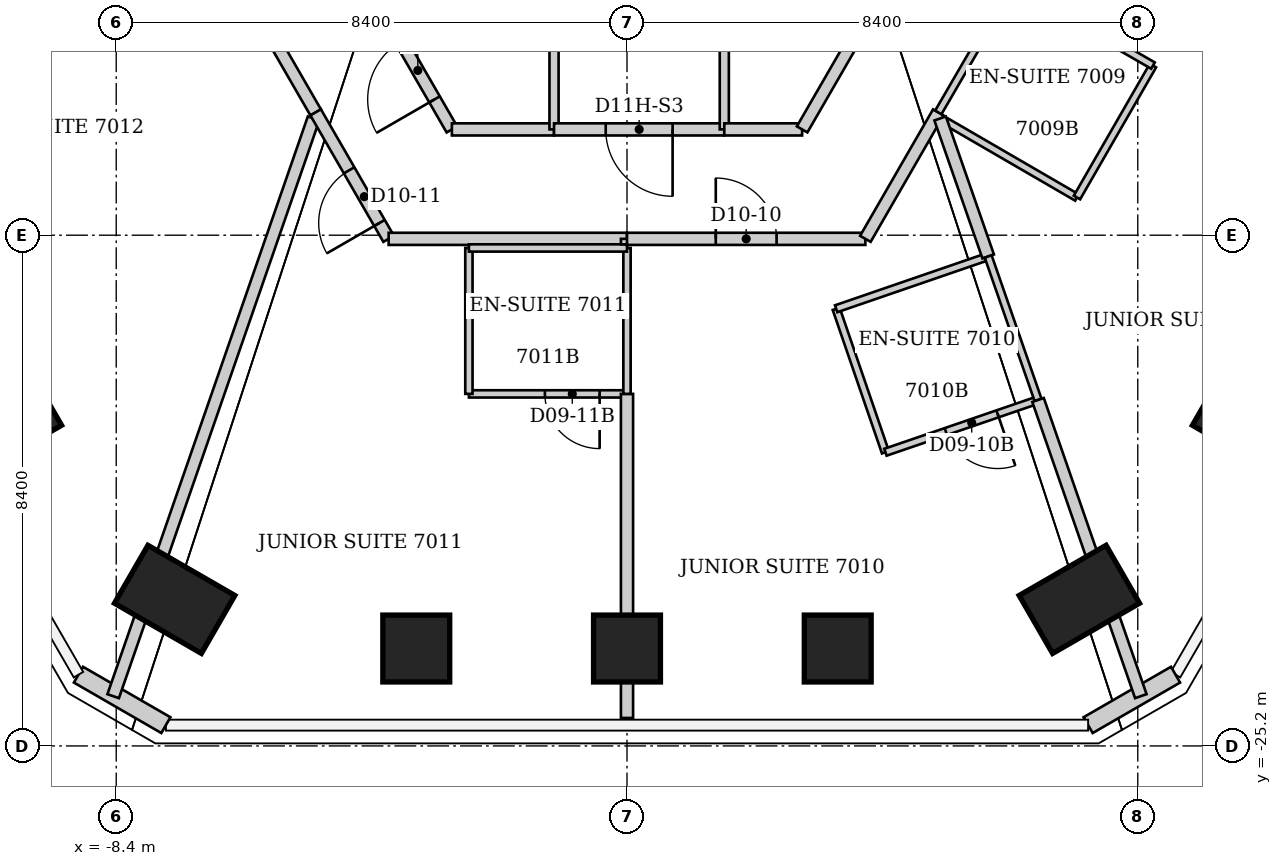
"""IFC4 building model, lengths in metres.
Left out: names, types, materials, properties, quantities, classifications, styles, units other than length and angle.
Written with IfcOpenShell. Run it as: python <this file> out.ifc"""

import sys

from ifc_helpers import new_model, si_unit, direction, frame, frame_2d, origin, origin_2d, place, context, subcontext, project, spatial, rectangle, extrude, element, fill, save


model = new_model("IFC4")
c1 = context("Model", 3, precision=1e-05, world=origin(), true_north=direction((0.0, 1.0)))
c2 = subcontext(c1, "Body", "Model", "MODEL_VIEW")
j1 = project(units=[si_unit("LENGTHUNIT", "METRE"), si_unit("PLANEANGLEUNIT", "RADIAN")], contexts=[c1])
p1 = place(None, origin())
s1 = spatial("IfcSite", under=j1, at=p1, CompositionType="ELEMENT")
p2 = place(p1, origin())
s2 = spatial("IfcBuilding", under=s1, at=p2, CompositionType="ELEMENT")
p3 = place(p2, frame((0.0, 0.0, 279.8)))
s3 = spatial("IfcBuildingStorey", under=s2, at=p3, CompositionType="ELEMENT", Elevation=279.8)
p4 = place(p3, frame((10.05, -19.725, 0.0), z_axis=(0.0, 0.0, 1.0), x_axis=(0.866025403784, -0.5, 0.0)))
e1 = element("IfcColumn", 1, at=p4, inside=s3, PredefinedType="COLUMN", context=c2, shape_type="SweptSolid", body=[
    extrude(rectangle(XDim=1.1, YDim=1.1, at=origin_2d()), origin(), (0.0, 0.0, 1.0), 3.8),
])
p5 = place(p3, frame((7.439, -22.79, 0.0), z_axis=(0.0, 0.0, 1.0), x_axis=(0.5, -0.866025403784, 0.0)))
e2 = element("IfcColumn", 2, at=p5, inside=s3, PredefinedType="COLUMN", context=c2, shape_type="SweptSolid", body=[
    extrude(rectangle(XDim=1.1, YDim=1.65, at=origin_2d()), origin(), (0.0, 0.0, 1.0), 3.8),
])
for number, where, z_axis, x_axis in (
    (3, (3.466, -23.598, 0.0), (0.0, 0.0, 1.0), (0.0, -1.0, 0.0)),
    (4, (0.0, -23.598, 0.0), (0.0, 0.0, 1.0), (0.0, -1.0, 0.0)),
    (5, (-3.466, -23.598, 0.0), (0.0, 0.0, 1.0), (0.0, -1.0, 0.0)),
):
    element("IfcColumn", number, at=place(p3, frame(where, z_axis=z_axis, x_axis=x_axis)), inside=s3, PredefinedType="COLUMN", context=c2, shape_type="SweptSolid", body=[
        extrude(rectangle(XDim=1.1, YDim=1.1, at=origin_2d()), origin(), (0.0, 0.0, 1.0), 3.8),
    ])
p6 = place(p3, frame((-7.439, -22.79, 0.0), z_axis=(0.0, 0.0, 1.0), x_axis=(-0.5, -0.866025403784, 0.0)))
e6 = element("IfcColumn", 6, at=p6, inside=s3, PredefinedType="COLUMN", context=c2, shape_type="SweptSolid", body=[
    extrude(rectangle(XDim=1.1, YDim=1.65, at=origin_2d()), origin(), (0.0, 0.0, 1.0), 3.8),
])
p7 = place(p3, frame((-10.05, -19.725, 0.0), z_axis=(0.0, 0.0, 1.0), x_axis=(-0.866025403784, -0.5, 0.0)))
e7 = element("IfcColumn", 7, at=p7, inside=s3, PredefinedType="COLUMN", context=c2, shape_type="SweptSolid", body=[
    extrude(rectangle(XDim=1.1, YDim=1.1, at=origin_2d()), origin(), (0.0, 0.0, 1.0), 3.8),
])
for number, where, z_axis, x_axis in (
    (8, (9.021, -24.028, 0.0), (0.0, 0.0, 1.0), (-0.866, -0.5, 0.0)),
    (9, (-7.583, -24.858, 0.0), (0.0, 0.0, 1.0), (-0.866, 0.5, 0.0)),
):
    element("IfcWall", number, at=place(p3, frame(where, z_axis=z_axis, x_axis=x_axis)), inside=s3, PredefinedType="SOLIDWALL", context=c2, shape_type="SweptSolid", body=[
        extrude(rectangle(XDim=1.66, YDim=0.3, at=frame_2d((0.83, 0.0))), origin(), (0.0, 0.0, 1.0), 3.64),
    ])
p8 = place(p3, frame((-8.45, -24.382, 0.0), z_axis=(0.0, 0.0, 1.0), x_axis=(0.327695764917, 0.944783300898, 0.0)))
e10 = element("IfcWall", 10, at=p8, inside=s3, PredefinedType="PARTITIONING", context=c2, shape_type="SweptSolid", body=[
    extrude(rectangle(XDim=10.058, YDim=0.2, at=frame_2d((5.029, 0.0))), origin(), (0.0, 0.0, 1.0), 3.64),
])
p9 = place(p3, frame((-8.11, -9.6, 0.0), z_axis=(0.0, 0.0, 1.0), x_axis=(0.49991915452, -0.866072074913, 0.0)))
e11 = element("IfcWall", 11, at=p9, inside=s3, PredefinedType="PARTITIONING", context=c2, shape_type="SweptSolid", body=[
    extrude(rectangle(XDim=5.981, YDim=0.2, at=frame_2d((2.99, 0.0))), origin(), (0.0, 0.0, 1.0), 3.64),
])
p10 = place(p9, frame((2.49, 0.0, 0.0)))
e12 = element("IfcOpeningElement", 12, at=p10, cuts=e11, PredefinedType="OPENING", context=c2, shape_type="SweptSolid", body=[
    extrude(rectangle(XDim=1.0, YDim=2.13, at=frame_2d((0.5, 1.065))), frame((0.0, 0.1, 0.0), z_axis=(0.0, -1.0, 0.0), x_axis=(1.0, 0.0, 0.0)), (0.0, 0.0, 1.0), 0.2),
])
p11 = place(p3, frame((-5.12, -14.78, 0.0), z_axis=(0.0, 0.0, 1.0), x_axis=(0.499813401482, -0.866133109688, 0.0)))
e13 = element("IfcWall", 13, at=p11, inside=s3, PredefinedType="PARTITIONING", context=c2, shape_type="SweptSolid", body=[
    extrude(rectangle(XDim=2.401, YDim=0.2, at=frame_2d((1.201, 0.0))), origin(), (0.0, 0.0, 1.0), 3.64),
])
p12 = place(p11, frame((1.1, 0.0, 0.0)))
e14 = element("IfcOpeningElement", 14, at=p12, cuts=e13, PredefinedType="OPENING", context=c2, shape_type="SweptSolid", body=[
    extrude(rectangle(XDim=1.0, YDim=2.13, at=frame_2d((0.5, 1.065))), frame((0.0, 0.1, 0.0), z_axis=(0.0, -1.0, 0.0), x_axis=(1.0, 0.0, 0.0)), (0.0, 0.0, 1.0), 0.2),
])
p13 = place(p3, frame((-3.92, -16.86, 0.0), z_axis=(0.0, 0.0, 1.0), x_axis=(1.0, 0.0, 0.0)))
e15 = element("IfcWall", 15, at=p13, inside=s3, PredefinedType="PARTITIONING", context=c2, shape_type="SweptSolid", body=[
    extrude(rectangle(XDim=3.92, YDim=0.2, at=frame_2d((1.96, 0.0))), origin(), (0.0, 0.0, 1.0), 3.64),
])
p14 = place(p3, frame((-2.88, -15.06, 0.0), z_axis=(0.0, 0.0, 1.0), x_axis=(-0.499983441833, 0.866034963436, 0.0)))
e16 = element("IfcWall", 16, at=p14, inside=s3, PredefinedType="PARTITIONING", context=c2, shape_type="SweptSolid", body=[
    extrude(rectangle(XDim=2.24, YDim=0.2, at=frame_2d((1.12, 0.0))), origin(), (0.0, 0.0, 1.0), 3.64),
])
p15 = place(p14, frame((0.57, 0.0, 0.0)))
e17 = element("IfcOpeningElement", 17, at=p15, cuts=e16, PredefinedType="OPENING", context=c2, shape_type="SweptSolid", body=[
    extrude(rectangle(XDim=1.1, YDim=2.2, at=frame_2d((0.55, 1.1))), frame((0.0, 0.1, 0.0), z_axis=(0.0, -1.0, 0.0), x_axis=(1.0, 0.0, 0.0)), (0.0, 0.0, 1.0), 0.2),
])
p16 = place(p3, frame((-2.6, -19.41, 0.0), z_axis=(0.0, 0.0, 1.0), x_axis=(1.0, 0.0, 0.0)))
e18 = element("IfcWall", 18, at=p16, inside=s3, PredefinedType="PARTITIONING", context=c2, shape_type="SweptSolid", body=[
    extrude(rectangle(XDim=2.6, YDim=0.12, at=frame_2d((1.3, 0.0))), origin(), (0.0, 0.0, 1.0), 3.64),
])
p17 = place(p16, frame((1.25, 0.0, 0.0)))
e19 = element("IfcOpeningElement", 19, at=p17, cuts=e18, PredefinedType="OPENING", context=c2, shape_type="SweptSolid", body=[
    extrude(rectangle(XDim=0.9, YDim=2.03, at=frame_2d((0.45, 1.015))), frame((0.0, 0.06, 0.0), z_axis=(0.0, -1.0, 0.0), x_axis=(1.0, 0.0, 0.0)), (0.0, 0.0, 1.0), 0.12),
])
p18 = place(p3, frame((-2.6, -17.01, 0.0), z_axis=(0.0, 0.0, 1.0), x_axis=(0.0, -1.0, 0.0)))
e20 = element("IfcWall", 20, at=p18, inside=s3, PredefinedType="PARTITIONING", context=c2, shape_type="SweptSolid", body=[
    extrude(rectangle(XDim=2.4, YDim=0.12, at=frame_2d((1.2, 0.0))), origin(), (0.0, 0.0, 1.0), 3.64),
])
p19 = place(p3, frame((-1.2, -15.06, 0.0), z_axis=(0.0, 0.0, 1.0), x_axis=(-1.0, 0.0, 0.0)))
e21 = element("IfcWall", 21, at=p19, inside=s3, PredefinedType="PARTITIONING", context=c2, shape_type="SweptSolid", body=[
    extrude(rectangle(XDim=1.68, YDim=0.2, at=frame_2d((0.84, 0.0))), origin(), (0.0, 0.0, 1.0), 3.64),
])
p20 = place(p3, frame((-1.2, -6.7, 0.0), z_axis=(0.0, 0.0, 1.0), x_axis=(0.0, -1.0, 0.0)))
e22 = element("IfcWall", 22, at=p20, inside=s3, PredefinedType="PARTITIONING", context=c2, shape_type="SweptSolid", body=[
    extrude(rectangle(XDim=8.36, YDim=0.15, at=frame_2d((4.18, 0.0))), origin(), (0.0, 0.0, 1.0), 3.64),
])
p21 = place(p3, frame((0.0, -24.74, 0.0), z_axis=(0.0, 0.0, 1.0), x_axis=(0.0, 1.0, 0.0)))
e23 = element("IfcWall", 23, at=p21, inside=s3, PredefinedType="PARTITIONING", context=c2, shape_type="SweptSolid", body=[
    extrude(rectangle(XDim=5.33, YDim=0.2, at=frame_2d((2.665, 0.0))), origin(), (0.0, 0.0, 1.0), 2.86),
])
p22 = place(p3, frame((0.0, -19.41, 0.0), z_axis=(0.0, 0.0, 1.0), x_axis=(0.0, 1.0, 0.0)))
e24 = element("IfcWall", 24, at=p22, inside=s3, PredefinedType="PARTITIONING", context=c2, shape_type="SweptSolid", body=[
    extrude(rectangle(XDim=2.4, YDim=0.12, at=frame_2d((1.2, 0.0))), origin(), (0.0, 0.0, 1.0), 2.86),
])
p23 = place(p3, frame((0.0, -17.01, 0.0), z_axis=(0.0, 0.0, 1.0), x_axis=(-1.0, 0.0, 0.0)))
e25 = element("IfcWall", 25, at=p23, inside=s3, PredefinedType="PARTITIONING", context=c2, shape_type="SweptSolid", body=[
    extrude(rectangle(XDim=2.6, YDim=0.12, at=frame_2d((1.3, 0.0))), origin(), (0.0, 0.0, 1.0), 3.64),
])
p24 = place(p3, frame((0.0, -16.95, 0.0), z_axis=(0.0, 0.0, 1.0), x_axis=(0.0, 1.0, 0.0)))
e26 = element("IfcWall", 26, at=p24, inside=s3, PredefinedType="PARTITIONING", context=c2, shape_type="SweptSolid", body=[
    extrude(rectangle(XDim=0.09, YDim=0.2, at=frame_2d((0.045, 0.0))), origin(), (0.0, 0.0, 1.0), 3.64),
])
p25 = place(p3, frame((0.0, -16.86, 0.0), z_axis=(0.0, 0.0, 1.0), x_axis=(1.0, 0.0, 0.0)))
e27 = element("IfcWall", 27, at=p25, inside=s3, PredefinedType="PARTITIONING", context=c2, shape_type="SweptSolid", body=[
    extrude(rectangle(XDim=3.92, YDim=0.2, at=frame_2d((1.96, 0.0))), origin(), (0.0, 0.0, 1.0), 3.64),
])
p26 = place(p25, frame((1.46, 0.0, 0.0)))
e28 = element("IfcOpeningElement", 28, at=p26, cuts=e27, PredefinedType="OPENING", context=c2, shape_type="SweptSolid", body=[
    extrude(rectangle(XDim=1.0, YDim=2.13, at=frame_2d((0.5, 1.065))), frame((0.0, 0.1, 0.0), z_axis=(0.0, -1.0, 0.0), x_axis=(1.0, 0.0, 0.0)), (0.0, 0.0, 1.0), 0.2),
])
p27 = place(p3, frame((1.6, -15.06, 0.0), z_axis=(0.0, 0.0, 1.0), x_axis=(-1.0, 0.0, 0.0)))
e29 = element("IfcWall", 29, at=p27, inside=s3, PredefinedType="PARTITIONING", context=c2, shape_type="SweptSolid", body=[
    extrude(rectangle(XDim=2.8, YDim=0.2, at=frame_2d((1.4, 0.0))), origin(), (0.0, 0.0, 1.0), 3.64),
])
p28 = place(p27, frame((0.85, 0.0, 0.0)))
e30 = element("IfcOpeningElement", 30, at=p28, cuts=e29, PredefinedType="OPENING", context=c2, shape_type="SweptSolid", body=[
    extrude(rectangle(XDim=1.1, YDim=2.2, at=frame_2d((0.55, 1.1))), frame((0.0, 0.1, 0.0), z_axis=(0.0, -1.0, 0.0), x_axis=(1.0, 0.0, 0.0)), (0.0, 0.0, 1.0), 0.2),
])
p29 = place(p3, frame((1.6, -6.7, 0.0), z_axis=(0.0, 0.0, 1.0), x_axis=(0.0, -1.0, 0.0)))
e31 = element("IfcWall", 31, at=p29, inside=s3, PredefinedType="PARTITIONING", context=c2, shape_type="SweptSolid", body=[
    extrude(rectangle(XDim=8.36, YDim=0.15, at=frame_2d((4.18, 0.0))), origin(), (0.0, 0.0, 1.0), 2.86),
])
p30 = place(p3, frame((2.88, -15.06, 0.0), z_axis=(0.0, 0.0, 1.0), x_axis=(-1.0, 0.0, 0.0)))
e32 = element("IfcWall", 32, at=p30, inside=s3, PredefinedType="PARTITIONING", context=c2, shape_type="SweptSolid", body=[
    extrude(rectangle(XDim=1.28, YDim=0.2, at=frame_2d((0.64, 0.0))), origin(), (0.0, 0.0, 1.0), 3.64),
])
p31 = place(p3, frame((3.44, -18.01, 0.0), z_axis=(0.0, 0.0, 1.0), x_axis=(0.324669532971, -0.945827518293, 0.0)))
e33 = element("IfcWall", 33, at=p31, inside=s3, PredefinedType="PARTITIONING", context=c2, shape_type="SweptSolid", body=[
    extrude(rectangle(XDim=2.495, YDim=0.12, at=frame_2d((1.248, 0.0))), origin(), (0.0, 0.0, 1.0), 3.64),
])
p32 = place(p3, frame((3.92, -16.86, 0.0), z_axis=(0.0, 0.0, 1.0), x_axis=(0.499693115345, 0.866202511239, 0.0)))
e34 = element("IfcWall", 34, at=p32, inside=s3, PredefinedType="PARTITIONING", context=c2, shape_type="SweptSolid", body=[
    extrude(rectangle(XDim=2.401, YDim=0.2, at=frame_2d((1.201, 0.0))), origin(), (0.0, 0.0, 1.0), 3.64),
])
p33 = place(p3, frame((4.25, -20.37, 0.0), z_axis=(0.0, 0.0, 1.0), x_axis=(0.945999971947, 0.324166705687, 0.0)))
e35 = element("IfcWall", 35, at=p33, inside=s3, PredefinedType="PARTITIONING", context=c2, shape_type="SweptSolid", body=[
    extrude(rectangle(XDim=2.653, YDim=0.12, at=frame_2d((1.327, 0.0))), origin(), (0.0, 0.0, 1.0), 3.64),
])
p34 = place(p33, frame((1.05, 0.0, 0.0)))
e36 = element("IfcOpeningElement", 36, at=p34, cuts=e35, PredefinedType="OPENING", context=c2, shape_type="SweptSolid", body=[
    extrude(rectangle(XDim=0.9, YDim=2.03, at=frame_2d((0.45, 1.015))), frame((0.0, 0.06, 0.0), z_axis=(0.0, -1.0, 0.0), x_axis=(1.0, 0.0, 0.0)), (0.0, 0.0, 1.0), 0.12),
])
p35 = place(p3, frame((5.12, -14.78, 0.0), z_axis=(0.0, 0.0, 1.0), x_axis=(0.502307685327, 0.86468895521, 0.0)))
e37 = element("IfcWall", 37, at=p35, inside=s3, PredefinedType="PARTITIONING", context=c2, shape_type="SweptSolid", body=[
    extrude(rectangle(XDim=2.429, YDim=0.12, at=frame_2d((1.214, 0.0))), origin(), (0.0, 0.0, 1.0), 3.64),
])
p36 = place(p3, frame((5.251, -14.933, 0.0), z_axis=(0.0, 0.0, 1.0), x_axis=(0.864892147873, -0.501957739803, 0.0)))
e38 = element("IfcWall", 38, at=p36, inside=s3, PredefinedType="PARTITIONING", context=c2, shape_type="SweptSolid", body=[
    extrude(rectangle(XDim=2.485, YDim=0.12, at=frame_2d((1.242, 0.0))), origin(), (0.0, 0.0, 1.0), 3.038),
])
p37 = place(p3, frame((5.94, -17.15, 0.0), z_axis=(0.0, 0.0, 1.0), x_axis=(-0.945601400786, -0.32532751318, 0.0)))
e39 = element("IfcWall", 39, at=p37, inside=s3, PredefinedType="PARTITIONING", context=c2, shape_type="SweptSolid", body=[
    extrude(rectangle(XDim=2.644, YDim=0.12, at=frame_2d((1.322, 0.0))), origin(), (0.0, 0.0, 1.0), 3.64),
])
p38 = place(p3, frame((5.94, -17.15, 0.0), z_axis=(0.0, 0.0, 1.0), x_axis=(-0.328725498061, 0.944425511581, 0.0)))
e40 = element("IfcWall", 40, at=p38, inside=s3, PredefinedType="PARTITIONING", context=c2, shape_type="SweptSolid", body=[
    extrude(rectangle(XDim=2.403, YDim=0.2, at=frame_2d((1.202, 0.0))), origin(), (0.0, 0.0, 1.0), 3.64),
])
p39 = place(p3, frame((5.94, -17.15, 0.0), z_axis=(0.0, 0.0, 1.0), x_axis=(0.32822120494, -0.944600889597, 0.0)))
e41 = element("IfcWall", 41, at=p39, inside=s3, PredefinedType="PARTITIONING", context=c2, shape_type="SweptSolid", body=[
    extrude(rectangle(XDim=2.499, YDim=0.12, at=frame_2d((1.249, 0.0))), origin(), (0.0, 0.0, 1.0), 3.64),
])
p40 = place(p3, frame((6.76, -19.51, 0.0), z_axis=(0.0, 0.0, 1.0), x_axis=(0.327780464108, -0.944753918938, 0.0)))
e42 = element("IfcWall", 42, at=p40, inside=s3, PredefinedType="PARTITIONING", context=c2, shape_type="SweptSolid", body=[
    extrude(rectangle(XDim=5.156, YDim=0.2, at=frame_2d((2.578, 0.0))), origin(), (0.0, 0.0, 1.0), 3.64),
])
p41 = place(p3, frame((7.4, -16.18, 0.0), z_axis=(0.0, 0.0, 1.0), x_axis=(0.499159685399, 0.866510016372, 0.0)))
e43 = element("IfcWall", 43, at=p41, inside=s3, PredefinedType="PARTITIONING", context=c2, shape_type="SweptSolid", body=[
    extrude(rectangle(XDim=2.504, YDim=0.12, at=frame_2d((1.252, 0.0))), origin(), (0.0, 0.0, 1.0), 3.64),
])
p42 = place(p3, frame((7.68, -6.75, 0.0), z_axis=(0.0, 0.0, 1.0), x_axis=(-0.500174600737, -0.865924574532, 0.0)))
e44 = element("IfcWall", 44, at=p42, inside=s3, PredefinedType="PARTITIONING", context=c2, shape_type="SweptSolid", body=[
    extrude(rectangle(XDim=9.597, YDim=0.2, at=frame_2d((4.798, 0.0))), origin(), (0.0, 0.0, 1.0), 3.64),
])
p43 = place(p42, frame((4.248, 0.0, 0.0)))
e45 = element("IfcOpeningElement", 45, at=p43, cuts=e44, PredefinedType="OPENING", context=c2, shape_type="SweptSolid", body=[
    extrude(rectangle(XDim=1.1, YDim=2.2, at=frame_2d((0.55, 1.1))), frame((0.0, 0.1, 0.0), z_axis=(0.0, -1.0, 0.0), x_axis=(1.0, 0.0, 0.0)), (0.0, 0.0, 1.0), 0.2),
])
p44 = place(p3, frame((8.65, -14.01, 0.0), z_axis=(0.0, 0.0, 1.0), x_axis=(-0.866592449628, 0.499016559092, 0.0)))
e46 = element("IfcWall", 46, at=p44, inside=s3, PredefinedType="PARTITIONING", context=c2, shape_type="SweptSolid", body=[
    extrude(rectangle(XDim=2.665, YDim=0.12, at=frame_2d((1.333, 0.0))), origin(), (0.0, 0.0, 1.0), 3.64),
])
p45 = place(p44, frame((1.466, 0.0, 0.0)))
e47 = element("IfcOpeningElement", 47, at=p45, cuts=e46, PredefinedType="OPENING", context=c2, shape_type="SweptSolid", body=[
    extrude(rectangle(XDim=0.9, YDim=2.03, at=frame_2d((0.45, 1.015))), frame((0.0, 0.06, 0.0), z_axis=(0.0, -1.0, 0.0), x_axis=(1.0, 0.0, 0.0)), (0.0, 0.0, 1.0), 0.12),
])
p46 = place(p26, origin())
e48 = element("IfcDoor", 48, at=p46, inside=s3, OperationType="SINGLE_SWING_LEFT", PredefinedType="DOOR", context=c2, shape_type="SweptSolid", body=[
    extrude(rectangle(XDim=1.0, YDim=2.13, at=frame_2d((0.5, 1.065))), frame((0.0, 0.025, 0.0), z_axis=(0.0, -1.0, 0.0), x_axis=(1.0, 0.0, 0.0)), (0.0, 0.0, 1.0), 0.05),
])
fill(e28, e48)
p47 = place(p34, origin())
e49 = element("IfcDoor", 49, at=p47, inside=s3, OperationType="SINGLE_SWING_RIGHT", PredefinedType="DOOR", context=c2, shape_type="SweptSolid", body=[
    extrude(rectangle(XDim=0.9, YDim=2.03, at=frame_2d((0.45, 1.015))), frame((0.0, 0.025, 0.0), z_axis=(0.0, -1.0, 0.0), x_axis=(1.0, 0.0, 0.0)), (0.0, 0.0, 1.0), 0.05),
])
fill(e36, e49)
p48 = place(p12, origin())
e50 = element("IfcDoor", 50, at=p48, inside=s3, OperationType="SINGLE_SWING_RIGHT", PredefinedType="DOOR", context=c2, shape_type="SweptSolid", body=[
    extrude(rectangle(XDim=1.0, YDim=2.13, at=frame_2d((0.5, 1.065))), frame((0.0, 0.025, 0.0), z_axis=(0.0, -1.0, 0.0), x_axis=(1.0, 0.0, 0.0)), (0.0, 0.0, 1.0), 0.05),
])
fill(e14, e50)
p49 = place(p17, origin())
e51 = element("IfcDoor", 51, at=p49, inside=s3, OperationType="SINGLE_SWING_RIGHT", PredefinedType="DOOR", context=c2, shape_type="SweptSolid", body=[
    extrude(rectangle(XDim=0.9, YDim=2.03, at=frame_2d((0.45, 1.015))), frame((0.0, 0.025, 0.0), z_axis=(0.0, -1.0, 0.0), x_axis=(1.0, 0.0, 0.0)), (0.0, 0.0, 1.0), 0.05),
])
fill(e19, e51)
p50 = place(p15, origin())
e52 = element("IfcDoor", 52, at=p50, inside=s3, OperationType="SINGLE_SWING_LEFT", PredefinedType="DOOR", context=c2, shape_type="SweptSolid", body=[
    extrude(rectangle(XDim=1.1, YDim=2.2, at=frame_2d((0.55, 1.1))), frame((0.0, 0.025, 0.0), z_axis=(0.0, -1.0, 0.0), x_axis=(1.0, 0.0, 0.0)), (0.0, 0.0, 1.0), 0.05),
])
fill(e17, e52)
p51 = place(p28, origin())
e53 = element("IfcDoor", 53, at=p51, inside=s3, OperationType="SINGLE_SWING_LEFT", PredefinedType="DOOR", context=c2, shape_type="SweptSolid", body=[
    extrude(rectangle(XDim=1.1, YDim=2.2, at=frame_2d((0.55, 1.1))), frame((0.0, 0.025, 0.0), z_axis=(0.0, -1.0, 0.0), x_axis=(1.0, 0.0, 0.0)), (0.0, 0.0, 1.0), 0.05),
])
fill(e30, e53)
save(model, sys.argv[1])
